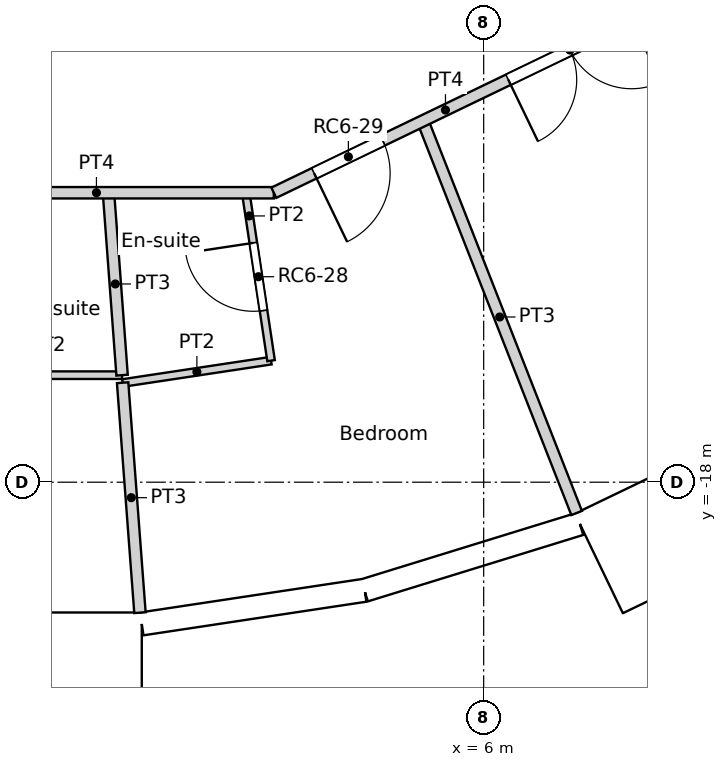
"""IFC4 building model, lengths in metres.
Left out: names, types, materials, properties, quantities, classifications, styles, units other than length and angle.
Written with IfcOpenShell. Run it as: python <this file> out.ifc"""

import sys

from ifc_helpers import new_model, si_unit, direction, frame, frame_2d, origin, origin_2d, place, context, subcontext, project, spatial, rectangle, circle, extrude, element, fill, save


model = new_model("IFC4")
c1 = context("Model", 3, precision=1e-05, world=origin(), true_north=direction((0.0, 1.0)))
c2 = subcontext(c1, "Body", "Model", "MODEL_VIEW")
j1 = project(units=[si_unit("LENGTHUNIT", "METRE"), si_unit("PLANEANGLEUNIT", "RADIAN")], contexts=[c1])
p1 = place(None, origin())
s1 = spatial("IfcSite", under=j1, at=p1, CompositionType="ELEMENT")
p2 = place(p1, origin())
s2 = spatial("IfcBuilding", under=s1, at=p2, CompositionType="ELEMENT")
p3 = place(p2, frame((0.0, 0.0, 283.8)))
s3 = spatial("IfcBuildingStorey", under=s2, at=p3, CompositionType="ELEMENT", Elevation=283.8)
for number, where, z_axis, x_axis in (
    (1, (1.406, -18.77, 0.0), (0.0, 0.0, 1.0), (1.0, 0.0, 0.0)),
    (2, (6.876, -17.521, 0.0), (0.0, 0.0, 1.0), (1.0, 0.0, 0.0)),
):
    element("IfcColumn", number, at=place(p3, frame(where, z_axis=z_axis, x_axis=x_axis)), inside=s3, PredefinedType="COLUMN", context=c2, shape_type="SweptSolid", body=[
        extrude(circle(Radius=0.45, at=origin_2d()), origin(), (0.0, 0.0, 1.0), 3.6),
    ])
p4 = place(p3, frame((-1.5, -20.441, -0.35), z_axis=(0.0, 0.0, 1.0), x_axis=(1.0, 0.0, 0.0)))
e3 = element("IfcWall", 3, at=p4, inside=s3, PredefinedType="ELEMENTEDWALL", context=c2, shape_type="SweptSolid", body=[
    extrude(rectangle(XDim=3.0, YDim=1.45, at=frame_2d((1.5, 0.0))), origin(), (0.0, 0.0, 1.0), 3.6),
])
p5 = place(p4, frame((1.5, 0.0, 1.9)))
e4 = element("IfcOpeningElement", 4, at=p5, cuts=e3, PredefinedType="OPENING", context=c2, shape_type="SweptSolid", body=[
    extrude(circle(Radius=0.9, at=origin_2d()), frame((0.0, 0.735, 0.0), z_axis=(0.0, -1.0, 0.0), x_axis=(1.0, 0.0, 0.0)), (0.0, 0.0, 1.0), 1.47),
])
p6 = place(p3, frame((1.504, -19.864, 0.0), z_axis=(0.0, 0.0, 1.0), x_axis=(0.988835775663, 0.149009425104, 0.0)))
e5 = element("IfcWall", 5, at=p6, inside=s3, PredefinedType="SOLIDWALL", context=c2, shape_type="SweptSolid", body=[
    extrude(rectangle(XDim=2.962, YDim=0.3, at=frame_2d((1.481, 0.0))), origin(), (0.0, 0.0, 1.0), 3.25),
])
p7 = place(p6, frame((1.481, 0.0, 1.55)))
e6 = element("IfcOpeningElement", 6, at=p7, cuts=e5, PredefinedType="OPENING", context=c2, shape_type="SweptSolid", body=[
    extrude(circle(Radius=0.9, at=origin_2d()), frame((0.0, 0.16, 0.0), z_axis=(0.0, -1.0, 0.0), x_axis=(1.0, 0.0, 0.0)), (0.0, 0.0, 1.0), 0.32),
])
p8 = place(p3, frame((4.433, -19.422, 0.0), z_axis=(0.0, 0.0, 1.0), x_axis=(0.955555982805, 0.29480970765, 0.0)))
e7 = element("IfcWall", 7, at=p8, inside=s3, PredefinedType="SOLIDWALL", context=c2, shape_type="SweptSolid", body=[
    extrude(rectangle(XDim=2.962, YDim=0.3, at=frame_2d((1.481, 0.0))), origin(), (0.0, 0.0, 1.0), 3.25),
])
p9 = place(p8, frame((1.481, 0.0, 1.55)))
e8 = element("IfcOpeningElement", 8, at=p9, cuts=e7, PredefinedType="OPENING", context=c2, shape_type="SweptSolid", body=[
    extrude(circle(Radius=0.9, at=origin_2d()), frame((0.0, 0.16, 0.0), z_axis=(0.0, -1.0, 0.0), x_axis=(1.0, 0.0, 0.0)), (0.0, 0.0, 1.0), 0.32),
])
p10 = place(p3, frame((7.518, -19.068, -0.35), z_axis=(0.0, 0.0, 1.0), x_axis=(0.900953362039, 0.433915935904, 0.0)))
e9 = element("IfcWall", 9, at=p10, inside=s3, PredefinedType="ELEMENTEDWALL", context=c2, shape_type="SweptSolid", body=[
    extrude(rectangle(XDim=3.0, YDim=1.45, at=frame_2d((1.5, 0.0))), origin(), (0.0, 0.0, 1.0), 3.6),
])
p11 = place(p10, frame((1.5, 0.0, 1.9)))
e10 = element("IfcOpeningElement", 10, at=p11, cuts=e9, PredefinedType="OPENING", context=c2, shape_type="SweptSolid", body=[
    extrude(circle(Radius=0.9, at=origin_2d()), frame((0.0, 0.735, 0.0), z_axis=(0.0, -1.0, 0.0), x_axis=(1.0, 0.0, 0.0)), (0.0, 0.0, 1.0), 1.47),
])
p12 = place(p3, frame((-3.239, -14.192, 0.0), z_axis=(0.0, 0.0, 1.0), x_axis=(1.0, 0.0, 0.0)))
e11 = element("IfcWall", 11, at=p12, inside=s3, PredefinedType="PARTITIONING", context=c2, shape_type="SweptSolid", body=[
    extrude(rectangle(XDim=6.478, YDim=0.15, at=frame_2d((3.239, 0.0))), origin(), (0.0, 0.0, 1.0), 3.25),
])
p13 = place(p12, frame((0.761, 0.0, 0.0)))
e12 = element("IfcOpeningElement", 12, at=p13, cuts=e11, PredefinedType="OPENING", context=c2, shape_type="SweptSolid", body=[
    extrude(rectangle(XDim=1.0, YDim=2.1, at=frame_2d((0.5, 1.05))), frame((0.0, 0.075, 0.0), z_axis=(0.0, -1.0, 0.0), x_axis=(1.0, 0.0, 0.0)), (0.0, 0.0, 1.0), 0.15),
])
p14 = place(p3, frame((3.239, -14.192, 0.0), z_axis=(0.0, 0.0, 1.0), x_axis=(0.900851590682, 0.434127183629, 0.0)))
e13 = element("IfcWall", 13, at=p14, inside=s3, PredefinedType="PARTITIONING", context=c2, shape_type="SweptSolid", body=[
    extrude(rectangle(XDim=6.479, YDim=0.15, at=frame_2d((3.239, 0.0))), origin(), (0.0, 0.0, 1.0), 3.25),
])
p15 = place(p14, frame((0.589, 0.0, 0.0)))
e14 = element("IfcOpeningElement", 14, at=p15, cuts=e13, PredefinedType="OPENING", context=c2, shape_type="SweptSolid", body=[
    extrude(rectangle(XDim=1.0, YDim=2.1, at=frame_2d((0.5, 1.05))), frame((0.0, 0.075, 0.0), z_axis=(0.0, -1.0, 0.0), x_axis=(1.0, 0.0, 0.0)), (0.0, 0.0, 1.0), 0.15),
])
p16 = place(p14, frame((3.425, 0.0, 0.0)))
e15 = element("IfcOpeningElement", 15, at=p16, cuts=e13, PredefinedType="OPENING", context=c2, shape_type="SweptSolid", body=[
    extrude(rectangle(XDim=1.8, YDim=2.1, at=frame_2d((0.9, 1.05))), frame((0.0, 0.075, 0.0), z_axis=(0.0, -1.0, 0.0), x_axis=(1.0, 0.0, 0.0)), (0.0, 0.0, 1.0), 0.15),
])
p17 = place(p3, frame((-0.722, -16.592, 0.0), z_axis=(0.0, 0.0, 1.0), x_axis=(1.0, 0.0, 0.0)))
e16 = element("IfcWall", 16, at=p17, inside=s3, PredefinedType="PARTITIONING", context=c2, shape_type="SweptSolid", body=[
    extrude(rectangle(XDim=1.965, YDim=0.1, at=frame_2d((0.982, 0.0))), origin(), (0.0, 0.0, 1.0), 3.25),
])
p18 = place(p3, frame((1.25, -16.691, 0.0), z_axis=(0.0, 0.0, 1.0), x_axis=(0.075164061246, -0.99717118084, 0.0)))
e17 = element("IfcWall", 17, at=p18, inside=s3, PredefinedType="PARTITIONING", context=c2, shape_type="SweptSolid", body=[
    extrude(rectangle(XDim=3.034, YDim=0.15, at=frame_2d((1.517, 0.0))), origin(), (0.0, 0.0, 1.0), 3.25),
])
p19 = place(p3, frame((1.064, -14.192, 0.0), z_axis=(0.0, 0.0, 1.0), x_axis=(0.074353677934, -0.997231934195, 0.0)))
e18 = element("IfcWall", 18, at=p19, inside=s3, PredefinedType="PARTITIONING", context=c2, shape_type="SweptSolid", body=[
    extrude(rectangle(XDim=2.407, YDim=0.15, at=frame_2d((1.203, 0.0))), origin(), (0.0, 0.0, 1.0), 3.25),
])
p20 = place(p3, frame((1.251, -16.695, 0.0), z_axis=(0.0, 0.0, 1.0), x_axis=(0.988831780565, 0.149035934407, 0.0)))
e19 = element("IfcWall", 19, at=p20, inside=s3, PredefinedType="PARTITIONING", context=c2, shape_type="SweptSolid", body=[
    extrude(rectangle(XDim=1.974, YDim=0.1, at=frame_2d((0.987, 0.0))), origin(), (0.0, 0.0, 1.0), 3.25),
])
p21 = place(p3, frame((2.87, -14.192, 0.0), z_axis=(0.0, 0.0, 1.0), x_axis=(0.148960349288, -0.988843169739, 0.0)))
e20 = element("IfcWall", 20, at=p21, inside=s3, PredefinedType="PARTITIONING", context=c2, shape_type="SweptSolid", body=[
    extrude(rectangle(XDim=2.234, YDim=0.1, at=frame_2d((1.117, 0.0))), origin(), (0.0, 0.0, 1.0), 3.25),
])
p22 = place(p21, frame((0.667, 0.0, 0.0)))
e21 = element("IfcOpeningElement", 21, at=p22, cuts=e20, PredefinedType="OPENING", context=c2, shape_type="SweptSolid", body=[
    extrude(rectangle(XDim=0.9, YDim=2.04, at=frame_2d((0.45, 1.02))), frame((0.0, 0.05, 0.0), z_axis=(0.0, -1.0, 0.0), x_axis=(1.0, 0.0, 0.0)), (0.0, 0.0, 1.0), 0.1),
])
p23 = place(p3, frame((5.199, -13.248, 0.0), z_axis=(0.0, 0.0, 1.0), x_axis=(0.365334662456, -0.930876245485, 0.0)))
e22 = element("IfcWall", 22, at=p23, inside=s3, PredefinedType="PARTITIONING", context=c2, shape_type="SweptSolid", body=[
    extrude(rectangle(XDim=5.54, YDim=0.15, at=frame_2d((2.77, 0.0))), origin(), (0.0, 0.0, 1.0), 3.25),
])
p24 = place(p5, origin())
e23 = element("IfcWindow", 23, at=p24, inside=s3, PartitioningType="SINGLE_PANEL", PredefinedType="WINDOW", context=c2, shape_type="SweptSolid", body=[
    extrude(circle(Radius=0.9, at=origin_2d()), frame((0.0, 0.695, 0.0), z_axis=(0.0, -1.0, 0.0), x_axis=(1.0, 0.0, 0.0)), (0.0, 0.0, 1.0), 0.1),
])
fill(e4, e23)
p25 = place(p7, origin())
e24 = element("IfcWindow", 24, at=p25, inside=s3, PartitioningType="SINGLE_PANEL", PredefinedType="WINDOW", context=c2, shape_type="SweptSolid", body=[
    extrude(circle(Radius=0.9, at=origin_2d()), frame((0.0, 0.12, 0.0), z_axis=(0.0, -1.0, 0.0), x_axis=(1.0, 0.0, 0.0)), (0.0, 0.0, 1.0), 0.1),
])
fill(e6, e24)
p26 = place(p9, origin())
e25 = element("IfcWindow", 25, at=p26, inside=s3, PartitioningType="SINGLE_PANEL", PredefinedType="WINDOW", context=c2, shape_type="SweptSolid", body=[
    extrude(circle(Radius=0.9, at=origin_2d()), frame((0.0, 0.12, 0.0), z_axis=(0.0, -1.0, 0.0), x_axis=(1.0, 0.0, 0.0)), (0.0, 0.0, 1.0), 0.1),
])
fill(e8, e25)
p27 = place(p11, origin())
e26 = element("IfcWindow", 26, at=p27, inside=s3, PartitioningType="SINGLE_PANEL", PredefinedType="WINDOW", context=c2, shape_type="SweptSolid", body=[
    extrude(circle(Radius=0.9, at=origin_2d()), frame((0.0, 0.695, 0.0), z_axis=(0.0, -1.0, 0.0), x_axis=(1.0, 0.0, 0.0)), (0.0, 0.0, 1.0), 0.1),
])
fill(e10, e26)
p28 = place(p22, origin())
e27 = element("IfcDoor", 27, at=p28, inside=s3, OperationType="SINGLE_SWING_RIGHT", PredefinedType="DOOR", context=c2, shape_type="SweptSolid", body=[
    extrude(rectangle(XDim=0.9, YDim=2.04, at=frame_2d((0.45, 1.02))), frame((0.0, 0.025, 0.0), z_axis=(0.0, -1.0, 0.0), x_axis=(1.0, 0.0, 0.0)), (0.0, 0.0, 1.0), 0.05),
])
fill(e21, e27)
p29 = place(p15, origin())
e28 = element("IfcDoor", 28, at=p29, inside=s3, OperationType="SINGLE_SWING_RIGHT", PredefinedType="DOOR", context=c2, shape_type="SweptSolid", body=[
    extrude(rectangle(XDim=1.0, YDim=2.1, at=frame_2d((0.5, 1.05))), frame((0.0, 0.025, 0.0), z_axis=(0.0, -1.0, 0.0), x_axis=(1.0, 0.0, 0.0)), (0.0, 0.0, 1.0), 0.05),
])
fill(e14, e28)
p30 = place(p16, origin())
e29 = element("IfcDoor", 29, at=p30, inside=s3, OperationType="DOUBLE_DOOR_SINGLE_SWING", PredefinedType="DOOR", context=c2, shape_type="SweptSolid", body=[
    extrude(rectangle(XDim=1.8, YDim=2.1, at=frame_2d((0.9, 1.05))), frame((0.0, 0.025, 0.0), z_axis=(0.0, -1.0, 0.0), x_axis=(1.0, 0.0, 0.0)), (0.0, 0.0, 1.0), 0.05),
])
fill(e15, e29)
save(model, sys.argv[1])
